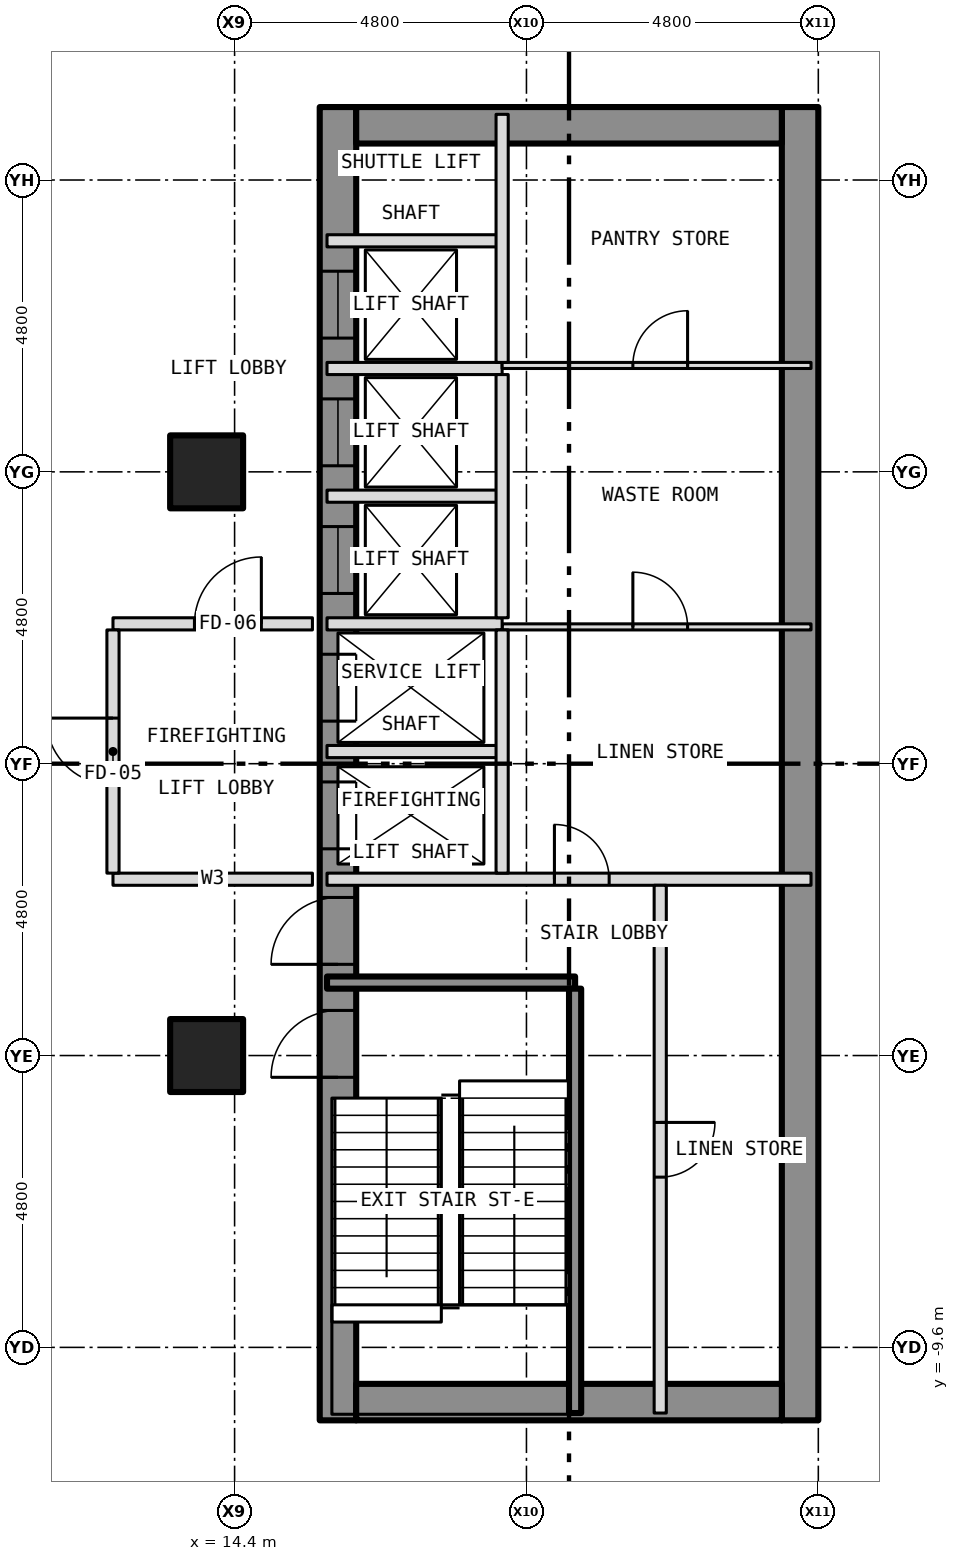
"""IFC4 building model, lengths in metres.
Left out: names, types, materials, properties, quantities, classifications, styles, units other than length and angle.
Written with IfcOpenShell. Run it as: python <this file> out.ifc"""

import sys

from ifc_helpers import new_model, si_unit, direction, frame, frame_2d, origin, origin_2d, place, context, subcontext, project, spatial, rectangle, hollow_rectangle, extrude, element, fill, save


model = new_model("IFC4")
c1 = context("Model", 3, precision=1e-05, world=origin(), true_north=direction((0.0, 1.0)))
c2 = subcontext(c1, "Body", "Model", "MODEL_VIEW")
j1 = project(units=[si_unit("LENGTHUNIT", "METRE"), si_unit("PLANEANGLEUNIT", "RADIAN")], contexts=[c1])
p1 = place(None, origin())
s1 = spatial("IfcSite", under=j1, at=p1, CompositionType="ELEMENT")
p2 = place(p1, origin())
s2 = spatial("IfcBuilding", under=s1, at=p2, CompositionType="ELEMENT")
p3 = place(p2, frame((0.0, 0.0, 15.5)))
s3 = spatial("IfcBuildingStorey", under=s2, at=p3, CompositionType="ELEMENT", Elevation=15.5)
for number, where, z_axis, x_axis in (
    (1, (13.94, -4.8, -0.2), (0.0, 0.0, 1.0), (1.0, 0.0, 0.0)),
    (2, (13.94, 4.8, -0.2), (0.0, 0.0, 1.0), (1.0, 0.0, 0.0)),
):
    element("IfcColumn", number, at=place(p3, frame(where, z_axis=z_axis, x_axis=x_axis)), inside=s3, PredefinedType="COLUMN", context=c2, shape_type="SweptSolid", body=[
        extrude(hollow_rectangle(XDim=1.2, YDim=1.2, WallThickness=0.07, at=origin_2d()), origin(), (0.0, 0.0, 1.0), 4.5),
    ])
p4 = place(p3, frame((16.1, -10.8, 0.0), z_axis=(0.0, 0.0, 1.0), x_axis=(0.0, 1.0, 0.0)))
e3 = element("IfcWall", 3, at=p4, inside=s3, PredefinedType="SHEAR", context=c2, shape_type="SweptSolid", body=[
    extrude(rectangle(XDim=21.6, YDim=0.6, at=frame_2d((10.8, 0.0))), origin(), (0.0, 0.0, 1.0), 4.2),
])
p5 = place(p4, frame((9.4, 0.0, 0.0)))
e4 = element("IfcOpeningElement", 4, at=p5, cuts=e3, PredefinedType="OPENING", context=c2, shape_type="SweptSolid", body=[
    extrude(rectangle(XDim=1.1, YDim=2.1, at=frame_2d((0.55, 1.05))), frame((0.0, 0.312, 0.0), z_axis=(0.0, -1.0, 0.0), x_axis=(1.0, 0.0, 0.0)), (0.0, 0.0, 1.0), 0.624),
])
p6 = place(p4, frame((11.5, 0.0, 0.0)))
e5 = element("IfcOpeningElement", 5, at=p6, cuts=e3, PredefinedType="OPENING", context=c2, shape_type="SweptSolid", body=[
    extrude(rectangle(XDim=1.1, YDim=2.1, at=frame_2d((0.55, 1.05))), frame((0.0, 0.312, 0.0), z_axis=(0.0, -1.0, 0.0), x_axis=(1.0, 0.0, 0.0)), (0.0, 0.0, 1.0), 0.624),
])
p7 = place(p4, frame((13.6, 0.0, 0.0)))
e6 = element("IfcOpeningElement", 6, at=p7, cuts=e3, PredefinedType="OPENING", context=c2, shape_type="SweptSolid", body=[
    extrude(rectangle(XDim=1.1, YDim=2.1, at=frame_2d((0.55, 1.05))), frame((0.0, 0.312, 0.0), z_axis=(0.0, -1.0, 0.0), x_axis=(1.0, 0.0, 0.0)), (0.0, 0.0, 1.0), 0.624),
])
p8 = place(p4, frame((15.7, 0.0, 0.0)))
e7 = element("IfcOpeningElement", 7, at=p8, cuts=e3, PredefinedType="OPENING", context=c2, shape_type="SweptSolid", body=[
    extrude(rectangle(XDim=1.1, YDim=2.1, at=frame_2d((0.55, 1.05))), frame((0.0, 0.312, 0.0), z_axis=(0.0, -1.0, 0.0), x_axis=(1.0, 0.0, 0.0)), (0.0, 0.0, 1.0), 0.624),
])
p9 = place(p4, frame((17.8, 0.0, 0.0)))
e8 = element("IfcOpeningElement", 8, at=p9, cuts=e3, PredefinedType="OPENING", context=c2, shape_type="SweptSolid", body=[
    extrude(rectangle(XDim=1.1, YDim=2.1, at=frame_2d((0.55, 1.05))), frame((0.0, 0.312, 0.0), z_axis=(0.0, -1.0, 0.0), x_axis=(1.0, 0.0, 0.0)), (0.0, 0.0, 1.0), 0.624),
])
p10 = place(p4, frame((5.642, 0.0, 0.0)))
e9 = element("IfcOpeningElement", 9, at=p10, cuts=e3, PredefinedType="OPENING", context=c2, shape_type="SweptSolid", body=[
    extrude(rectangle(XDim=1.1, YDim=2.1, at=frame_2d((0.55, 1.05))), frame((0.0, 0.312, 0.0), z_axis=(0.0, -1.0, 0.0), x_axis=(1.0, 0.0, 0.0)), (0.0, 0.0, 1.0), 0.624),
])
p11 = place(p4, frame((7.5, 0.0, 0.0)))
e10 = element("IfcOpeningElement", 10, at=p11, cuts=e3, PredefinedType="OPENING", context=c2, shape_type="SweptSolid", body=[
    extrude(rectangle(XDim=1.1, YDim=2.1, at=frame_2d((0.55, 1.05))), frame((0.0, 0.312, 0.0), z_axis=(0.0, -1.0, 0.0), x_axis=(1.0, 0.0, 0.0)), (0.0, 0.0, 1.0), 0.624),
])
p12 = place(p3, frame((23.7, -10.8, 0.0), z_axis=(0.0, 0.0, 1.0), x_axis=(0.0, 1.0, 0.0)))
e11 = element("IfcWall", 11, at=p12, inside=s3, PredefinedType="SHEAR", context=c2, shape_type="SweptSolid", body=[
    extrude(rectangle(XDim=21.6, YDim=0.6, at=frame_2d((10.8, 0.0))), origin(), (0.0, 0.0, 1.0), 4.2),
])
for number, where, z_axis, x_axis in (
    (12, (16.4, 10.5, 0.0), (0.0, 0.0, 1.0), (1.0, 0.0, 0.0)),
    (13, (16.4, -10.5, 0.0), (0.0, 0.0, 1.0), (1.0, 0.0, 0.0)),
):
    element("IfcWall", number, at=place(p3, frame(where, z_axis=z_axis, x_axis=x_axis)), inside=s3, PredefinedType="SHEAR", context=c2, shape_type="SweptSolid", body=[
        extrude(rectangle(XDim=7.0, YDim=0.6, at=frame_2d((3.5, 0.0))), origin(), (0.0, 0.0, 1.0), 4.2),
    ])
p13 = place(p3, frame((15.92, -3.6, 0.0), z_axis=(0.0, 0.0, 1.0), x_axis=(1.0, 0.0, 0.0)))
e14 = element("IfcWall", 14, at=p13, inside=s3, PredefinedType="SHEAR", context=c2, shape_type="SweptSolid", body=[
    extrude(rectangle(XDim=4.08, YDim=0.2, at=frame_2d((2.04, 0.0))), origin(), (0.0, 0.0, 1.0), 4.2),
])
p14 = place(p3, frame((12.4, -1.9, 0.0), z_axis=(0.0, 0.0, 1.0), x_axis=(1.0, 0.0, 0.0)))
e15 = element("IfcWall", 15, at=p14, inside=s3, PredefinedType="PARTITIONING", context=c2, shape_type="SweptSolid", body=[
    extrude(rectangle(XDim=3.28, YDim=0.2, at=frame_2d((1.64, 0.0))), origin(), (0.0, 0.0, 1.0), 4.3),
])
p15 = place(p3, frame((15.92, -1.9, 0.0), z_axis=(0.0, 0.0, 1.0), x_axis=(1.0, 0.0, 0.0)))
e16 = element("IfcWall", 16, at=p15, inside=s3, PredefinedType="PARTITIONING", context=c2, shape_type="SweptSolid", body=[
    extrude(rectangle(XDim=7.96, YDim=0.2, at=frame_2d((3.98, 0.0))), origin(), (0.0, 0.0, 1.0), 4.2),
])
p16 = place(p15, frame((3.74, 0.0, 0.0)))
e17 = element("IfcOpeningElement", 17, at=p16, cuts=e16, PredefinedType="OPENING", context=c2, shape_type="SweptSolid", body=[
    extrude(rectangle(XDim=0.9, YDim=2.1, at=frame_2d((0.45, 1.05))), frame((0.0, 0.112, 0.0), z_axis=(0.0, -1.0, 0.0), x_axis=(1.0, 0.0, 0.0)), (0.0, 0.0, 1.0), 0.224),
])
p17 = place(p3, frame((15.92, 0.2, 0.0), z_axis=(0.0, 0.0, 1.0), x_axis=(1.0, 0.0, 0.0)))
e18 = element("IfcWall", 18, at=p17, inside=s3, PredefinedType="PARTITIONING", context=c2, shape_type="SweptSolid", body=[
    extrude(rectangle(XDim=2.88, YDim=0.2, at=frame_2d((1.44, 0.0))), origin(), (0.0, 0.0, 1.0), 4.2),
])
p18 = place(p3, frame((18.8, 2.25, 0.0), z_axis=(0.0, 0.0, 1.0), x_axis=(1.0, 0.0, 0.0)))
e19 = element("IfcWall", 19, at=p18, inside=s3, PredefinedType="PARTITIONING", context=c2, shape_type="SweptSolid", body=[
    extrude(rectangle(XDim=5.08, YDim=0.1, at=frame_2d((2.54, 0.0))), origin(), (0.0, 0.0, 1.0), 4.2),
])
p19 = place(p18, frame((2.15, 0.0, 0.0)))
e20 = element("IfcOpeningElement", 20, at=p19, cuts=e19, PredefinedType="OPENING", context=c2, shape_type="SweptSolid", body=[
    extrude(rectangle(XDim=0.9, YDim=2.1, at=frame_2d((0.45, 1.05))), frame((0.0, 0.062, 0.0), z_axis=(0.0, -1.0, 0.0), x_axis=(1.0, 0.0, 0.0)), (0.0, 0.0, 1.0), 0.124),
])
p20 = place(p3, frame((12.4, 2.3, 0.0), z_axis=(0.0, 0.0, 1.0), x_axis=(1.0, 0.0, 0.0)))
e21 = element("IfcWall", 21, at=p20, inside=s3, PredefinedType="PARTITIONING", context=c2, shape_type="SweptSolid", body=[
    extrude(rectangle(XDim=3.28, YDim=0.2, at=frame_2d((1.64, 0.0))), origin(), (0.0, 0.0, 1.0), 4.3),
])
p21 = place(p20, frame((1.34, 0.0, 0.0)))
e22 = element("IfcOpeningElement", 22, at=p21, cuts=e21, PredefinedType="OPENING", context=c2, shape_type="SweptSolid", body=[
    extrude(rectangle(XDim=1.1, YDim=2.1, at=frame_2d((0.55, 1.05))), frame((0.0, 0.112, 0.0), z_axis=(0.0, -1.0, 0.0), x_axis=(1.0, 0.0, 0.0)), (0.0, 0.0, 1.0), 0.224),
])
for number, where, z_axis, x_axis in (
    (23, (15.92, 2.3, 0.0), (0.0, 0.0, 1.0), (1.0, 0.0, 0.0)),
    (24, (15.92, 4.4, 0.0), (0.0, 0.0, 1.0), (1.0, 0.0, 0.0)),
    (25, (15.92, 6.5, 0.0), (0.0, 0.0, 1.0), (1.0, 0.0, 0.0)),
):
    element("IfcWall", number, at=place(p3, frame(where, z_axis=z_axis, x_axis=x_axis)), inside=s3, PredefinedType="PARTITIONING", context=c2, shape_type="SweptSolid", body=[
        extrude(rectangle(XDim=2.88, YDim=0.2, at=frame_2d((1.44, 0.0))), origin(), (0.0, 0.0, 1.0), 4.2),
    ])
p22 = place(p3, frame((18.8, 6.55, 0.0), z_axis=(0.0, 0.0, 1.0), x_axis=(1.0, 0.0, 0.0)))
e26 = element("IfcWall", 26, at=p22, inside=s3, PredefinedType="PARTITIONING", context=c2, shape_type="SweptSolid", body=[
    extrude(rectangle(XDim=5.08, YDim=0.1, at=frame_2d((2.54, 0.0))), origin(), (0.0, 0.0, 1.0), 4.2),
])
p23 = place(p22, frame((2.15, 0.0, 0.0)))
e27 = element("IfcOpeningElement", 27, at=p23, cuts=e26, PredefinedType="OPENING", context=c2, shape_type="SweptSolid", body=[
    extrude(rectangle(XDim=0.9, YDim=2.1, at=frame_2d((0.45, 1.05))), frame((0.0, 0.062, 0.0), z_axis=(0.0, -1.0, 0.0), x_axis=(1.0, 0.0, 0.0)), (0.0, 0.0, 1.0), 0.124),
])
p24 = place(p3, frame((15.92, 8.6, 0.0), z_axis=(0.0, 0.0, 1.0), x_axis=(1.0, 0.0, 0.0)))
e28 = element("IfcWall", 28, at=p24, inside=s3, PredefinedType="PARTITIONING", context=c2, shape_type="SweptSolid", body=[
    extrude(rectangle(XDim=2.88, YDim=0.2, at=frame_2d((1.44, 0.0))), origin(), (0.0, 0.0, 1.0), 4.2),
])
p25 = place(p3, frame((12.4, -1.8, 0.0), z_axis=(0.0, 0.0, 1.0), x_axis=(0.0, 1.0, 0.0)))
e29 = element("IfcWall", 29, at=p25, inside=s3, PredefinedType="PARTITIONING", context=c2, shape_type="SweptSolid", body=[
    extrude(rectangle(XDim=4.0, YDim=0.2, at=frame_2d((2.0, 0.0))), origin(), (0.0, 0.0, 1.0), 4.3),
])
p26 = place(p25, frame((1.45, 0.0, 0.0)))
e30 = element("IfcOpeningElement", 30, at=p26, cuts=e29, PredefinedType="OPENING", context=c2, shape_type="SweptSolid", body=[
    extrude(rectangle(XDim=1.1, YDim=2.1, at=frame_2d((0.55, 1.05))), frame((0.0, 0.112, 0.0), z_axis=(0.0, -1.0, 0.0), x_axis=(1.0, 0.0, 0.0)), (0.0, 0.0, 1.0), 0.224),
])
for number, where, z_axis, x_axis in (
    (31, (18.8, -1.8, 0.0), (0.0, 0.0, 1.0), (0.0, 1.0, 0.0)),
    (32, (18.8, 2.4, 0.0), (0.0, 0.0, 1.0), (0.0, 1.0, 0.0)),
):
    element("IfcWall", number, at=place(p3, frame(where, z_axis=z_axis, x_axis=x_axis)), inside=s3, PredefinedType="PARTITIONING", context=c2, shape_type="SweptSolid", body=[
        extrude(rectangle(XDim=4.0, YDim=0.2, at=frame_2d((2.0, 0.0))), origin(), (0.0, 0.0, 1.0), 4.2),
    ])
p27 = place(p3, frame((18.8, 6.6, 0.0), z_axis=(0.0, 0.0, 1.0), x_axis=(0.0, 1.0, 0.0)))
e33 = element("IfcWall", 33, at=p27, inside=s3, PredefinedType="PARTITIONING", context=c2, shape_type="SweptSolid", body=[
    extrude(rectangle(XDim=4.08, YDim=0.2, at=frame_2d((2.04, 0.0))), origin(), (0.0, 0.0, 1.0), 4.2),
])
p28 = place(p3, frame((20.0, -10.68, 0.0), z_axis=(0.0, 0.0, 1.0), x_axis=(0.0, 1.0, 0.0)))
e34 = element("IfcWall", 34, at=p28, inside=s3, PredefinedType="SHEAR", context=c2, shape_type="SweptSolid", body=[
    extrude(rectangle(XDim=6.98, YDim=0.2, at=frame_2d((3.49, 0.0))), origin(), (0.0, 0.0, 1.0), 4.2),
])
p29 = place(p3, frame((21.4, -10.68, 0.0), z_axis=(0.0, 0.0, 1.0), x_axis=(0.0, 1.0, 0.0)))
e35 = element("IfcWall", 35, at=p29, inside=s3, PredefinedType="PARTITIONING", context=c2, shape_type="SweptSolid", body=[
    extrude(rectangle(XDim=8.68, YDim=0.2, at=frame_2d((4.34, 0.0))), origin(), (0.0, 0.0, 1.0), 4.2),
])
p30 = place(p29, frame((3.88, 0.0, 0.0)))
e36 = element("IfcOpeningElement", 36, at=p30, cuts=e35, PredefinedType="OPENING", context=c2, shape_type="SweptSolid", body=[
    extrude(rectangle(XDim=0.9, YDim=2.1, at=frame_2d((0.45, 1.05))), frame((0.0, 0.112, 0.0), z_axis=(0.0, -1.0, 0.0), x_axis=(1.0, 0.0, 0.0)), (0.0, 0.0, 1.0), 0.224),
])
p31 = place(p5, origin())
e37 = element("IfcDoor", 37, at=p31, inside=s3, OperationType="SLIDING_TO_LEFT", PredefinedType="DOOR", context=c2, shape_type="SweptSolid", body=[
    extrude(rectangle(XDim=1.1, YDim=2.1, at=frame_2d((0.55, 1.05))), frame((0.0, 0.025, 0.0), z_axis=(0.0, -1.0, 0.0), x_axis=(1.0, 0.0, 0.0)), (0.0, 0.0, 1.0), 0.05),
])
fill(e4, e37)
p32 = place(p6, origin())
e38 = element("IfcDoor", 38, at=p32, inside=s3, OperationType="SLIDING_TO_LEFT", PredefinedType="DOOR", context=c2, shape_type="SweptSolid", body=[
    extrude(rectangle(XDim=1.1, YDim=2.1, at=frame_2d((0.55, 1.05))), frame((0.0, 0.025, 0.0), z_axis=(0.0, -1.0, 0.0), x_axis=(1.0, 0.0, 0.0)), (0.0, 0.0, 1.0), 0.05),
])
fill(e5, e38)
p33 = place(p7, origin())
e39 = element("IfcDoor", 39, at=p33, inside=s3, OperationType="SLIDING_TO_LEFT", PredefinedType="DOOR", context=c2, shape_type="SweptSolid", body=[
    extrude(rectangle(XDim=1.1, YDim=2.1, at=frame_2d((0.55, 1.05))), frame((0.0, 0.025, 0.0), z_axis=(0.0, -1.0, 0.0), x_axis=(1.0, 0.0, 0.0)), (0.0, 0.0, 1.0), 0.05),
])
fill(e6, e39)
p34 = place(p8, origin())
e40 = element("IfcDoor", 40, at=p34, inside=s3, OperationType="SLIDING_TO_LEFT", PredefinedType="DOOR", context=c2, shape_type="SweptSolid", body=[
    extrude(rectangle(XDim=1.1, YDim=2.1, at=frame_2d((0.55, 1.05))), frame((0.0, 0.025, 0.0), z_axis=(0.0, -1.0, 0.0), x_axis=(1.0, 0.0, 0.0)), (0.0, 0.0, 1.0), 0.05),
])
fill(e7, e40)
p35 = place(p9, origin())
e41 = element("IfcDoor", 41, at=p35, inside=s3, OperationType="SLIDING_TO_LEFT", PredefinedType="DOOR", context=c2, shape_type="SweptSolid", body=[
    extrude(rectangle(XDim=1.1, YDim=2.1, at=frame_2d((0.55, 1.05))), frame((0.0, 0.025, 0.0), z_axis=(0.0, -1.0, 0.0), x_axis=(1.0, 0.0, 0.0)), (0.0, 0.0, 1.0), 0.05),
])
fill(e8, e41)
p36 = place(p10, origin())
e42 = element("IfcDoor", 42, at=p36, inside=s3, OperationType="SINGLE_SWING_LEFT", PredefinedType="DOOR", context=c2, shape_type="SweptSolid", body=[
    extrude(rectangle(XDim=1.1, YDim=2.1, at=frame_2d((0.55, 1.05))), frame((0.0, 0.025, 0.0), z_axis=(0.0, -1.0, 0.0), x_axis=(1.0, 0.0, 0.0)), (0.0, 0.0, 1.0), 0.05),
])
fill(e9, e42)
p37 = place(p11, origin())
e43 = element("IfcDoor", 43, at=p37, inside=s3, OperationType="SINGLE_SWING_LEFT", PredefinedType="DOOR", context=c2, shape_type="SweptSolid", body=[
    extrude(rectangle(XDim=1.1, YDim=2.1, at=frame_2d((0.55, 1.05))), frame((0.0, 0.025, 0.0), z_axis=(0.0, -1.0, 0.0), x_axis=(1.0, 0.0, 0.0)), (0.0, 0.0, 1.0), 0.05),
])
fill(e10, e43)
p38 = place(p30, origin())
e44 = element("IfcDoor", 44, at=p38, inside=s3, OperationType="SINGLE_SWING_RIGHT", PredefinedType="DOOR", context=c2, shape_type="SweptSolid", body=[
    extrude(rectangle(XDim=0.9, YDim=2.1, at=frame_2d((0.45, 1.05))), frame((0.0, 0.025, 0.0), z_axis=(0.0, -1.0, 0.0), x_axis=(1.0, 0.0, 0.0)), (0.0, 0.0, 1.0), 0.05),
])
fill(e36, e44)
p39 = place(p16, origin())
e45 = element("IfcDoor", 45, at=p39, inside=s3, OperationType="SINGLE_SWING_LEFT", PredefinedType="DOOR", context=c2, shape_type="SweptSolid", body=[
    extrude(rectangle(XDim=0.9, YDim=2.1, at=frame_2d((0.45, 1.05))), frame((0.0, 0.025, 0.0), z_axis=(0.0, -1.0, 0.0), x_axis=(1.0, 0.0, 0.0)), (0.0, 0.0, 1.0), 0.05),
])
fill(e17, e45)
p40 = place(p19, origin())
e46 = element("IfcDoor", 46, at=p40, inside=s3, OperationType="SINGLE_SWING_LEFT", PredefinedType="DOOR", context=c2, shape_type="SweptSolid", body=[
    extrude(rectangle(XDim=0.9, YDim=2.1, at=frame_2d((0.45, 1.05))), frame((0.0, 0.025, 0.0), z_axis=(0.0, -1.0, 0.0), x_axis=(1.0, 0.0, 0.0)), (0.0, 0.0, 1.0), 0.05),
])
fill(e20, e46)
p41 = place(p23, origin())
e47 = element("IfcDoor", 47, at=p41, inside=s3, OperationType="SINGLE_SWING_RIGHT", PredefinedType="DOOR", context=c2, shape_type="SweptSolid", body=[
    extrude(rectangle(XDim=0.9, YDim=2.1, at=frame_2d((0.45, 1.05))), frame((0.0, 0.025, 0.0), z_axis=(0.0, -1.0, 0.0), x_axis=(1.0, 0.0, 0.0)), (0.0, 0.0, 1.0), 0.05),
])
fill(e27, e47)
p42 = place(p26, origin())
e48 = element("IfcDoor", 48, at=p42, inside=s3, OperationType="SINGLE_SWING_RIGHT", PredefinedType="DOOR", context=c2, shape_type="SweptSolid", body=[
    extrude(rectangle(XDim=1.1, YDim=2.1, at=frame_2d((0.55, 1.05))), frame((0.0, 0.025, 0.0), z_axis=(0.0, -1.0, 0.0), x_axis=(1.0, 0.0, 0.0)), (0.0, 0.0, 1.0), 0.05),
])
fill(e30, e48)
p43 = place(p21, origin())
e49 = element("IfcDoor", 49, at=p43, inside=s3, OperationType="SINGLE_SWING_RIGHT", PredefinedType="DOOR", context=c2, shape_type="SweptSolid", body=[
    extrude(rectangle(XDim=1.1, YDim=2.1, at=frame_2d((0.55, 1.05))), frame((0.0, 0.025, 0.0), z_axis=(0.0, -1.0, 0.0), x_axis=(1.0, 0.0, 0.0)), (0.0, 0.0, 1.0), 0.05),
])
fill(e22, e49)
save(model, sys.argv[1])
